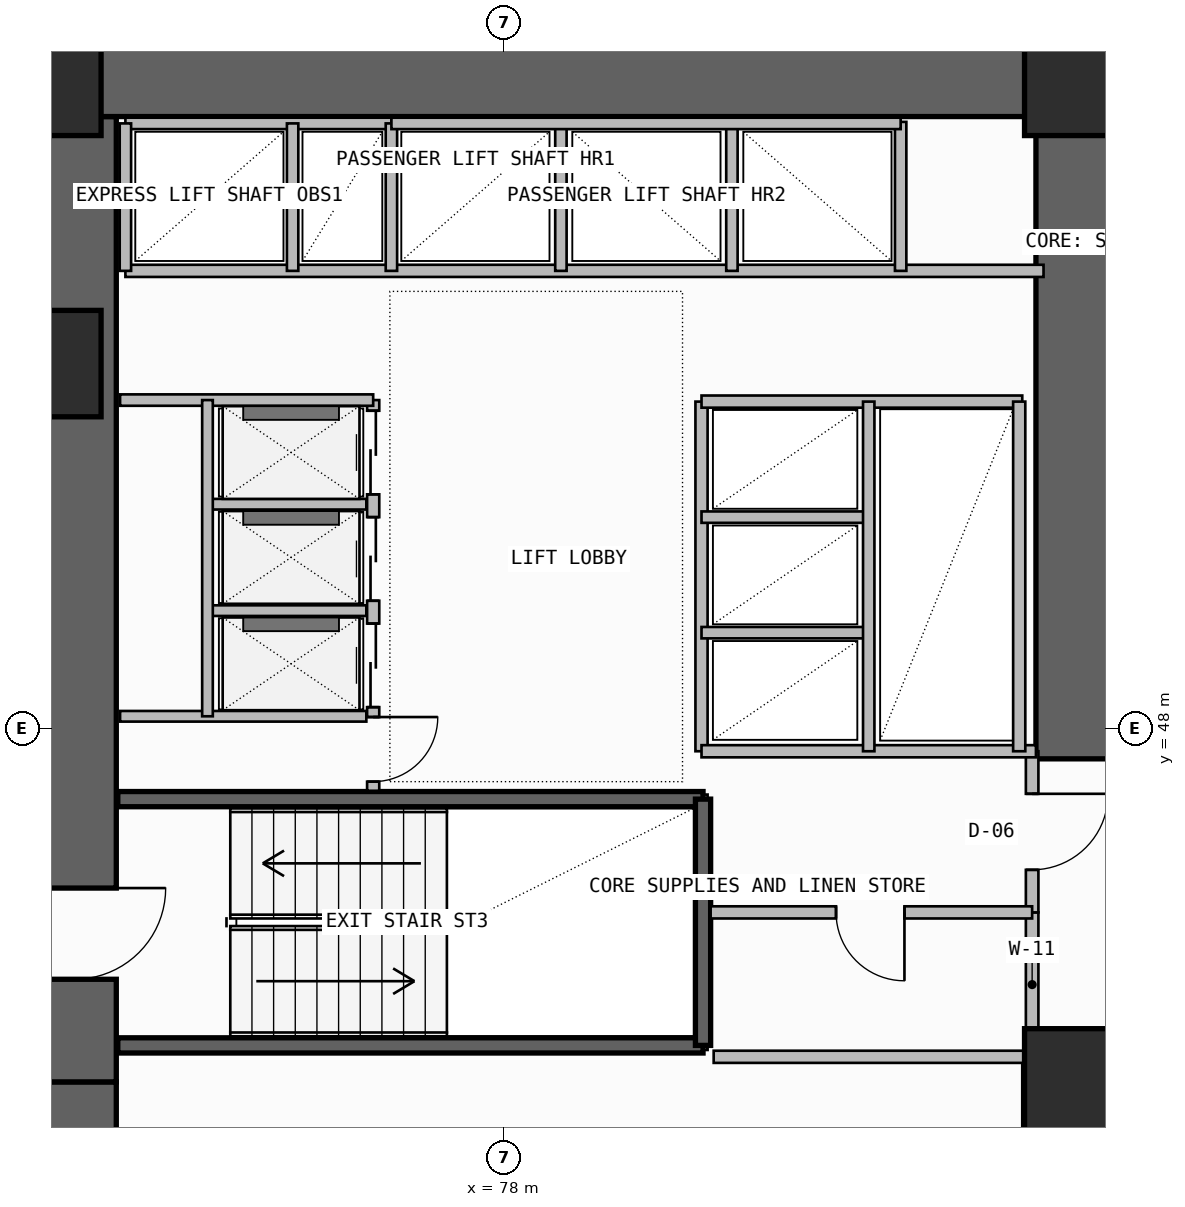
"""IFC4 building model, lengths in metres.
Left out: names, types, materials, properties, quantities, classifications, styles, units other than length and angle.
Written with IfcOpenShell. Run it as: python <this file> out.ifc"""

import sys

from ifc_helpers import new_model, si_unit, direction, frame, frame_2d, origin, origin_2d, place, context, subcontext, project, spatial, rectangle, extrude, element, fill, save


model = new_model("IFC4")
c1 = context("Model", 3, precision=1e-05, world=origin(), true_north=direction((0.0, 1.0)))
c2 = subcontext(c1, "Body", "Model", "MODEL_VIEW")
j1 = project(units=[si_unit("LENGTHUNIT", "METRE"), si_unit("PLANEANGLEUNIT", "RADIAN")], contexts=[c1])
p1 = place(None, origin())
s1 = spatial("IfcSite", under=j1, at=p1, CompositionType="ELEMENT")
p2 = place(p1, origin())
s2 = spatial("IfcBuilding", under=s1, at=p2, CompositionType="ELEMENT")
p3 = place(p2, frame((0.0, 0.0, 70.5)))
s3 = spatial("IfcBuildingStorey", under=s2, at=p3, CompositionType="ELEMENT", Elevation=70.5)
p4 = place(p3, frame((72.35, 35.5, -0.26), z_axis=(0.0, 0.0, 1.0), x_axis=(0.0, 1.0, 0.0)))
e1 = element("IfcWall", 1, at=p4, inside=s3, PredefinedType="SHEAR", context=c2, shape_type="SweptSolid", body=[
    extrude(rectangle(XDim=7.85, YDim=1.1, at=frame_2d((3.925, 0.0))), origin(), (0.0, 0.0, 1.0), 3.6),
])
p5 = place(p4, frame((1.45, 0.0, 0.26)))
e2 = element("IfcOpeningElement", 2, at=p5, cuts=e1, PredefinedType="OPENING", context=c2, shape_type="SweptSolid", body=[
    extrude(rectangle(XDim=1.2, YDim=2.2, at=frame_2d((0.6, 1.1))), frame((0.0, 0.56, 0.0), z_axis=(0.0, -1.0, 0.0), x_axis=(1.0, 0.0, 0.0)), (0.0, 0.0, 1.0), 1.12),
])
p6 = place(p3, frame((72.35, 43.35, -0.26), z_axis=(0.0, 0.0, 1.0), x_axis=(0.0, 1.0, 0.0)))
e3 = element("IfcWall", 3, at=p6, inside=s3, PredefinedType="SHEAR", context=c2, shape_type="SweptSolid", body=[
    extrude(rectangle(XDim=12.7, YDim=1.1, at=frame_2d((6.35, 0.0))), origin(), (0.0, 0.0, 1.0), 3.6),
])
p7 = place(p6, frame((1.35, 0.0, 0.26)))
e4 = element("IfcOpeningElement", 4, at=p7, cuts=e3, PredefinedType="OPENING", context=c2, shape_type="SweptSolid", body=[
    extrude(rectangle(XDim=1.2, YDim=2.2, at=frame_2d((0.6, 1.1))), frame((0.0, 0.56, 0.0), z_axis=(0.0, -1.0, 0.0), x_axis=(1.0, 0.0, 0.0)), (0.0, 0.0, 1.0), 1.12),
])
p8 = place(p3, frame((71.8, 56.6, -0.26), z_axis=(0.0, 0.0, 1.0), x_axis=(1.0, 0.0, 0.0)))
e5 = element("IfcWall", 5, at=p8, inside=s3, PredefinedType="SHEAR", context=c2, shape_type="SweptSolid", body=[
    extrude(rectangle(XDim=14.3, YDim=1.1, at=frame_2d((7.15, 0.0))), origin(), (0.0, 0.0, 1.0), 3.6),
])
p9 = place(p3, frame((85.55, 47.6, -0.26), z_axis=(0.0, 0.0, 1.0), x_axis=(0.0, 1.0, 0.0)))
e6 = element("IfcWall", 6, at=p9, inside=s3, PredefinedType="SHEAR", context=c2, shape_type="SweptSolid", body=[
    extrude(rectangle(XDim=8.45, YDim=1.1, at=frame_2d((4.225, 0.0))), origin(), (0.0, 0.0, 1.0), 3.6),
])
for number, where, z_axis, x_axis in (
    (7, (85.55, 43.35, 0.0), (0.0, 0.0, 1.0), (1.0, 0.0, 0.0)),
    (8, (72.0, 52.8, 0.0), (0.0, 0.0, 1.0), (1.0, 0.0, 0.0)),
    (9, (72.0, 56.5, 0.0), (0.0, 0.0, 1.0), (1.0, 0.0, 0.0)),
    (10, (85.55, 56.5, 0.0), (0.0, 0.0, 1.0), (1.0, 0.0, 0.0)),
):
    element("IfcColumn", number, at=place(p3, frame(where, z_axis=z_axis, x_axis=x_axis)), inside=s3, PredefinedType="COLUMN", context=c2, shape_type="SweptSolid", body=[
        extrude(rectangle(XDim=1.4, YDim=1.4, at=origin_2d()), origin(), (0.0, 0.0, 1.0), 3.6),
    ])
p10 = place(p3, frame((84.92, 38.85, 0.0), z_axis=(0.0, 0.0, 1.0), x_axis=(0.0, 1.0, 0.0)))
e11 = element("IfcWall", 11, at=p10, inside=s3, PredefinedType="SOLIDWALL", context=c2, shape_type="SweptSolid", body=[
    extrude(rectangle(XDim=4.83, YDim=0.2, at=frame_2d((2.415, 0.0))), origin(), (0.0, 0.0, 1.0), 3.34),
])
p11 = place(p10, frame((1.25, 0.0, 0.0)))
e12 = element("IfcOpeningElement", 12, at=p11, cuts=e11, PredefinedType="OPENING", context=c2, shape_type="SweptSolid", body=[
    extrude(rectangle(XDim=1.1, YDim=2.2, at=frame_2d((0.55, 1.1))), frame((0.0, 0.11, 0.0), z_axis=(0.0, -1.0, 0.0), x_axis=(1.0, 0.0, 0.0)), (0.0, 0.0, 1.0), 0.22),
])
for number, where, z_axis, x_axis in (
    (13, (72.92, 43.83, -0.26), (0.0, 0.0, 1.0), (1.0, 0.0, 0.0)),
    (14, (72.92, 47.07, -0.26), (0.0, 0.0, 1.0), (1.0, 0.0, 0.0)),
):
    element("IfcWall", number, at=place(p3, frame(where, z_axis=z_axis, x_axis=x_axis)), inside=s3, PredefinedType="SOLIDWALL", context=c2, shape_type="SweptSolid", body=[
        extrude(rectangle(XDim=7.7, YDim=0.2, at=frame_2d((3.85, 0.0))), origin(), (0.0, 0.0, 1.0), 3.6),
    ])
p12 = place(p3, frame((80.62, 43.83, -0.26), z_axis=(0.0, 0.0, 1.0), x_axis=(0.0, 1.0, 0.0)))
e15 = element("IfcWall", 15, at=p12, inside=s3, PredefinedType="SOLIDWALL", context=c2, shape_type="SweptSolid", body=[
    extrude(rectangle(XDim=3.24, YDim=0.2, at=frame_2d((1.62, 0.0))), origin(), (0.0, 0.0, 1.0), 3.6),
])
p13 = place(p3, frame((84.95, 43.68, 0.0), z_axis=(0.0, 0.0, 1.0), x_axis=(0.0, 1.0, 0.0)))
e16 = element("IfcWall", 16, at=p13, inside=s3, PredefinedType="PLUMBINGWALL", context=c2, shape_type="SweptSolid", body=[
    extrude(rectangle(XDim=1.9, YDim=0.165, at=frame_2d((0.95, 0.0))), origin(), (0.0, 0.0, 1.0), 3.34),
])
p14 = place(p3, frame((84.95, 45.58, 0.0), z_axis=(0.0, 0.0, 1.0), x_axis=(0.0, 1.0, 0.0)))
e17 = element("IfcWall", 17, at=p14, inside=s3, PredefinedType="PARTITIONING", context=c2, shape_type="SweptSolid", body=[
    extrude(rectangle(XDim=2.12, YDim=0.165, at=frame_2d((1.06, 0.0))), origin(), (0.0, 0.0, 1.0), 3.34),
])
p15 = place(p14, frame((0.56, 0.0, 0.0)))
e18 = element("IfcOpeningElement", 18, at=p15, cuts=e17, PredefinedType="OPENING", context=c2, shape_type="SweptSolid", body=[
    extrude(rectangle(XDim=1.0, YDim=2.2, at=frame_2d((0.5, 1.1))), frame((0.0, 0.093, 0.0), z_axis=(0.0, -1.0, 0.0), x_axis=(1.0, 0.0, 0.0)), (0.0, 0.0, 1.0), 0.185),
])
p16 = place(p3, frame((80.72, 45.58, 0.0), z_axis=(0.0, 0.0, 1.0), x_axis=(1.0, 0.0, 0.0)))
e19 = element("IfcWall", 19, at=p16, inside=s3, PredefinedType="PLUMBINGWALL", context=c2, shape_type="SweptSolid", body=[
    extrude(rectangle(XDim=4.23, YDim=0.16, at=frame_2d((2.115, 0.0))), origin(), (0.0, 0.0, 1.0), 3.34),
])
p17 = place(p16, frame((1.65, 0.0, 0.0)))
e20 = element("IfcOpeningElement", 20, at=p17, cuts=e19, PredefinedType="OPENING", context=c2, shape_type="SweptSolid", body=[
    extrude(rectangle(XDim=0.9, YDim=2.1, at=frame_2d((0.45, 1.05))), frame((0.0, 0.09, 0.0), z_axis=(0.0, -1.0, 0.0), x_axis=(1.0, 0.0, 0.0)), (0.0, 0.0, 1.0), 0.18),
])
p18 = place(p3, frame((80.76, 43.68, 0.0), z_axis=(0.0, 0.0, 1.0), x_axis=(1.0, 0.0, 0.0)))
e21 = element("IfcWall", 21, at=p18, inside=s3, PredefinedType="PLUMBINGWALL", context=c2, shape_type="SweptSolid", body=[
    extrude(rectangle(XDim=4.19, YDim=0.16, at=frame_2d((2.095, 0.0))), origin(), (0.0, 0.0, 1.0), 3.34),
])
p19 = place(p3, frame((76.28, 47.18, 0.0), z_axis=(0.0, 0.0, 1.0), x_axis=(0.0, 1.0, 0.0)))
e22 = element("IfcWall", 22, at=p19, inside=s3, PredefinedType="SOLIDWALL", context=c2, shape_type="SweptSolid", body=[
    extrude(rectangle(XDim=5.14, YDim=0.16, at=frame_2d((2.57, 0.0))), origin(), (0.0, 0.0, 1.0), 3.34),
])
p20 = place(p19, frame((1.1, 0.0, 0.0)))
e23 = element("IfcOpeningElement", 23, at=p20, cuts=e22, PredefinedType="OPENING", context=c2, shape_type="SweptSolid", body=[
    extrude(rectangle(XDim=1.1, YDim=2.25, at=frame_2d((0.55, 1.125))), frame((0.0, 0.09, 0.0), z_axis=(0.0, -1.0, 0.0), x_axis=(1.0, 0.0, 0.0)), (0.0, 0.0, 1.0), 0.18),
])
p21 = place(p19, frame((2.5, 0.0, 0.0)))
e24 = element("IfcOpeningElement", 24, at=p21, cuts=e22, PredefinedType="OPENING", context=c2, shape_type="SweptSolid", body=[
    extrude(rectangle(XDim=1.1, YDim=2.25, at=frame_2d((0.55, 1.125))), frame((0.0, 0.09, 0.0), z_axis=(0.0, -1.0, 0.0), x_axis=(1.0, 0.0, 0.0)), (0.0, 0.0, 1.0), 0.18),
])
p22 = place(p19, frame((3.9, 0.0, 0.0)))
e25 = element("IfcOpeningElement", 25, at=p22, cuts=e22, PredefinedType="OPENING", context=c2, shape_type="SweptSolid", body=[
    extrude(rectangle(XDim=1.1, YDim=2.25, at=frame_2d((0.55, 1.125))), frame((0.0, 0.09, 0.0), z_axis=(0.0, -1.0, 0.0), x_axis=(1.0, 0.0, 0.0)), (0.0, 0.0, 1.0), 0.18),
])
p23 = place(p19, frame((0.12, 0.0, 0.0)))
e26 = element("IfcOpeningElement", 26, at=p23, cuts=e22, PredefinedType="OPENING", context=c2, shape_type="SweptSolid", body=[
    extrude(rectangle(XDim=0.85, YDim=2.05, at=frame_2d((0.425, 1.025))), frame((0.0, 0.09, 0.0), z_axis=(0.0, -1.0, 0.0), x_axis=(1.0, 0.0, 0.0)), (0.0, 0.0, 1.0), 0.18),
])
p24 = place(p3, frame((72.95, 52.32, 0.0), z_axis=(0.0, 0.0, 1.0), x_axis=(1.0, 0.0, 0.0)))
e27 = element("IfcWall", 27, at=p24, inside=s3, PredefinedType="SOLIDWALL", context=c2, shape_type="SweptSolid", body=[
    extrude(rectangle(XDim=3.33, YDim=0.15, at=frame_2d((1.665, 0.0))), origin(), (0.0, 0.0, 1.0), 3.34),
])
p25 = place(p3, frame((72.95, 48.16, 0.0), z_axis=(0.0, 0.0, 1.0), x_axis=(1.0, 0.0, 0.0)))
e28 = element("IfcWall", 28, at=p25, inside=s3, PredefinedType="PLUMBINGWALL", context=c2, shape_type="SweptSolid", body=[
    extrude(rectangle(XDim=3.24, YDim=0.14, at=frame_2d((1.62, 0.0))), origin(), (0.0, 0.0, 1.0), 3.34),
])
for number, where, z_axis, x_axis in (
    (29, (74.15, 49.55, 0.0), (0.0, 0.0, 1.0), (1.0, 0.0, 0.0)),
    (30, (74.15, 50.95, 0.0), (0.0, 0.0, 1.0), (1.0, 0.0, 0.0)),
):
    element("IfcWall", number, at=place(p3, frame(where, z_axis=z_axis, x_axis=x_axis)), inside=s3, PredefinedType="PLUMBINGWALL", context=c2, shape_type="SweptSolid", body=[
        extrude(rectangle(XDim=2.04, YDim=0.14, at=frame_2d((1.02, 0.0))), origin(), (0.0, 0.0, 1.0), 3.34),
    ])
p26 = place(p3, frame((74.1, 48.16, 0.0), z_axis=(0.0, 0.0, 1.0), x_axis=(0.0, 1.0, 0.0)))
e31 = element("IfcWall", 31, at=p26, inside=s3, PredefinedType="PLUMBINGWALL", context=c2, shape_type="SweptSolid", body=[
    extrude(rectangle(XDim=4.16, YDim=0.14, at=frame_2d((2.08, 0.0))), origin(), (0.0, 0.0, 1.0), 3.34),
])
p27 = place(p3, frame((80.6, 47.7, 0.0), z_axis=(0.0, 0.0, 1.0), x_axis=(0.0, 1.0, 0.0)))
e32 = element("IfcWall", 32, at=p27, inside=s3, PredefinedType="SOLIDWALL", context=c2, shape_type="SweptSolid", body=[
    extrude(rectangle(XDim=4.6, YDim=0.16, at=frame_2d((2.3, 0.0))), origin(), (0.0, 0.0, 1.0), 3.34),
])
p28 = place(p3, frame((80.6, 47.7, 0.0), z_axis=(0.0, 0.0, 1.0), x_axis=(1.0, 0.0, 0.0)))
e33 = element("IfcWall", 33, at=p28, inside=s3, PredefinedType="SOLIDWALL", context=c2, shape_type="SweptSolid", body=[
    extrude(rectangle(XDim=4.4, YDim=0.16, at=frame_2d((2.2, 0.0))), origin(), (0.0, 0.0, 1.0), 3.34),
])
p29 = place(p3, frame((80.6, 52.3, 0.0), z_axis=(0.0, 0.0, 1.0), x_axis=(1.0, 0.0, 0.0)))
e34 = element("IfcWall", 34, at=p29, inside=s3, PredefinedType="SOLIDWALL", context=c2, shape_type="SweptSolid", body=[
    extrude(rectangle(XDim=4.22, YDim=0.16, at=frame_2d((2.11, 0.0))), origin(), (0.0, 0.0, 1.0), 3.34),
])
for number, where, z_axis, x_axis in (
    (35, (80.6, 49.26, 0.0), (0.0, 0.0, 1.0), (1.0, 0.0, 0.0)),
    (36, (80.6, 50.78, 0.0), (0.0, 0.0, 1.0), (1.0, 0.0, 0.0)),
):
    element("IfcWall", number, at=place(p3, frame(where, z_axis=z_axis, x_axis=x_axis)), inside=s3, PredefinedType="PLUMBINGWALL", context=c2, shape_type="SweptSolid", body=[
        extrude(rectangle(XDim=2.2, YDim=0.15, at=frame_2d((1.1, 0.0))), origin(), (0.0, 0.0, 1.0), 3.34),
    ])
p30 = place(p3, frame((82.8, 47.7, 0.0), z_axis=(0.0, 0.0, 1.0), x_axis=(0.0, 1.0, 0.0)))
e37 = element("IfcWall", 37, at=p30, inside=s3, PredefinedType="PLUMBINGWALL", context=c2, shape_type="SweptSolid", body=[
    extrude(rectangle(XDim=4.6, YDim=0.15, at=frame_2d((2.3, 0.0))), origin(), (0.0, 0.0, 1.0), 3.34),
])
p31 = place(p3, frame((84.78, 47.7, 0.0), z_axis=(0.0, 0.0, 1.0), x_axis=(0.0, 1.0, 0.0)))
e38 = element("IfcWall", 38, at=p31, inside=s3, PredefinedType="SOLIDWALL", context=c2, shape_type="SweptSolid", body=[
    extrude(rectangle(XDim=4.6, YDim=0.16, at=frame_2d((2.3, 0.0))), origin(), (0.0, 0.0, 1.0), 3.34),
])
p32 = place(p3, frame((73.02, 54.02, 0.0), z_axis=(0.0, 0.0, 1.0), x_axis=(1.0, 0.0, 0.0)))
e39 = element("IfcWall", 39, at=p32, inside=s3, PredefinedType="SOLIDWALL", context=c2, shape_type="SweptSolid", body=[
    extrude(rectangle(XDim=12.08, YDim=0.16, at=frame_2d((6.04, 0.0))), origin(), (0.0, 0.0, 1.0), 3.34),
])
p33 = place(p3, frame((73.02, 55.96, 0.0), z_axis=(0.0, 0.0, 1.0), x_axis=(1.0, 0.0, 0.0)))
e40 = element("IfcWall", 40, at=p33, inside=s3, PredefinedType="SOLIDWALL", context=c2, shape_type="SweptSolid", body=[
    extrude(rectangle(XDim=3.5, YDim=0.15, at=frame_2d((1.75, 0.0))), origin(), (0.0, 0.0, 1.0), 3.34),
])
p34 = place(p3, frame((73.02, 54.02, 0.0), z_axis=(0.0, 0.0, 1.0), x_axis=(0.0, 1.0, 0.0)))
e41 = element("IfcWall", 41, at=p34, inside=s3, PredefinedType="PLUMBINGWALL", context=c2, shape_type="SweptSolid", body=[
    extrude(rectangle(XDim=1.94, YDim=0.15, at=frame_2d((0.97, 0.0))), origin(), (0.0, 0.0, 1.0), 3.34),
])
p35 = place(p3, frame((76.52, 54.02, 0.0), z_axis=(0.0, 0.0, 1.0), x_axis=(0.0, 1.0, 0.0)))
e42 = element("IfcWall", 42, at=p35, inside=s3, PredefinedType="SOLIDWALL", context=c2, shape_type="SweptSolid", body=[
    extrude(rectangle(XDim=1.94, YDim=0.15, at=frame_2d((0.97, 0.0))), origin(), (0.0, 0.0, 1.0), 3.34),
])
p36 = place(p3, frame((75.22, 54.02, 0.0), z_axis=(0.0, 0.0, 1.0), x_axis=(0.0, 1.0, 0.0)))
e43 = element("IfcWall", 43, at=p36, inside=s3, PredefinedType="PLUMBINGWALL", context=c2, shape_type="SweptSolid", body=[
    extrude(rectangle(XDim=1.94, YDim=0.15, at=frame_2d((0.97, 0.0))), origin(), (0.0, 0.0, 1.0), 3.34),
])
for number, where, z_axis, x_axis in (
    (44, (78.75, 54.02, 0.0), (0.0, 0.0, 1.0), (0.0, 1.0, 0.0)),
    (45, (81.0, 54.02, 0.0), (0.0, 0.0, 1.0), (0.0, 1.0, 0.0)),
):
    element("IfcWall", number, at=place(p3, frame(where, z_axis=z_axis, x_axis=x_axis)), inside=s3, PredefinedType="PLUMBINGWALL", context=c2, shape_type="SweptSolid", body=[
        extrude(rectangle(XDim=1.96, YDim=0.15, at=frame_2d((0.98, 0.0))), origin(), (0.0, 0.0, 1.0), 3.34),
    ])
p37 = place(p3, frame((83.22, 54.02, 0.0), z_axis=(0.0, 0.0, 1.0), x_axis=(0.0, 1.0, 0.0)))
e46 = element("IfcWall", 46, at=p37, inside=s3, PredefinedType="SOLIDWALL", context=c2, shape_type="SweptSolid", body=[
    extrude(rectangle(XDim=1.96, YDim=0.15, at=frame_2d((0.98, 0.0))), origin(), (0.0, 0.0, 1.0), 3.34),
])
p38 = place(p3, frame((76.52, 55.96, 0.0), z_axis=(0.0, 0.0, 1.0), x_axis=(1.0, 0.0, 0.0)))
e47 = element("IfcWall", 47, at=p38, inside=s3, PredefinedType="SOLIDWALL", context=c2, shape_type="SweptSolid", body=[
    extrude(rectangle(XDim=6.7, YDim=0.15, at=frame_2d((3.35, 0.0))), origin(), (0.0, 0.0, 1.0), 3.34),
])
p39 = place(p7, frame((1.2, 0.0, 0.0), z_axis=(0.0, 0.0, 1.0), x_axis=(-1.0, 0.0, 0.0)))
e48 = element("IfcDoor", 48, at=p39, inside=s3, OperationType="SINGLE_SWING_LEFT", PredefinedType="USERDEFINED", context=c2, shape_type="SweptSolid", body=[
    extrude(rectangle(XDim=1.2, YDim=2.2, at=frame_2d((0.6, 1.1))), frame((0.0, 0.025, 0.0), z_axis=(0.0, -1.0, 0.0), x_axis=(1.0, 0.0, 0.0)), (0.0, 0.0, 1.0), 0.05),
])
fill(e4, e48)
p40 = place(p15, frame((1.0, 0.0, 0.0), z_axis=(0.0, 0.0, 1.0), x_axis=(-1.0, 0.0, 0.0)))
e49 = element("IfcDoor", 49, at=p40, inside=s3, OperationType="SINGLE_SWING_LEFT", PredefinedType="DOOR", context=c2, shape_type="SweptSolid", body=[
    extrude(rectangle(XDim=1.0, YDim=2.2, at=frame_2d((0.5, 1.1))), frame((0.0, 0.025, 0.0), z_axis=(0.0, -1.0, 0.0), x_axis=(1.0, 0.0, 0.0)), (0.0, 0.0, 1.0), 0.05),
])
fill(e18, e49)
p41 = place(p17, frame((0.9, 0.0, 0.0), z_axis=(0.0, 0.0, 1.0), x_axis=(-1.0, 0.0, 0.0)))
e50 = element("IfcDoor", 50, at=p41, inside=s3, OperationType="SINGLE_SWING_LEFT", PredefinedType="DOOR", context=c2, shape_type="SweptSolid", body=[
    extrude(rectangle(XDim=0.9, YDim=2.1, at=frame_2d((0.45, 1.05))), frame((0.0, 0.025, 0.0), z_axis=(0.0, -1.0, 0.0), x_axis=(1.0, 0.0, 0.0)), (0.0, 0.0, 1.0), 0.05),
])
fill(e20, e50)
p42 = place(p20, origin())
e51 = element("IfcDoor", 51, at=p42, inside=s3, OperationType="DOUBLE_DOOR_SLIDING", PredefinedType="DOOR", context=c2, shape_type="SweptSolid", body=[
    extrude(rectangle(XDim=1.1, YDim=2.25, at=frame_2d((0.55, 1.125))), frame((0.0, 0.025, 0.0), z_axis=(0.0, -1.0, 0.0), x_axis=(1.0, 0.0, 0.0)), (0.0, 0.0, 1.0), 0.05),
])
fill(e23, e51)
p43 = place(p21, origin())
e52 = element("IfcDoor", 52, at=p43, inside=s3, OperationType="DOUBLE_DOOR_SLIDING", PredefinedType="DOOR", context=c2, shape_type="SweptSolid", body=[
    extrude(rectangle(XDim=1.1, YDim=2.25, at=frame_2d((0.55, 1.125))), frame((0.0, 0.025, 0.0), z_axis=(0.0, -1.0, 0.0), x_axis=(1.0, 0.0, 0.0)), (0.0, 0.0, 1.0), 0.05),
])
fill(e24, e52)
p44 = place(p22, origin())
e53 = element("IfcDoor", 53, at=p44, inside=s3, OperationType="DOUBLE_DOOR_SLIDING", PredefinedType="DOOR", context=c2, shape_type="SweptSolid", body=[
    extrude(rectangle(XDim=1.1, YDim=2.25, at=frame_2d((0.55, 1.125))), frame((0.0, 0.025, 0.0), z_axis=(0.0, -1.0, 0.0), x_axis=(1.0, 0.0, 0.0)), (0.0, 0.0, 1.0), 0.05),
])
fill(e25, e53)
p45 = place(p23, frame((0.85, 0.0, 0.0), z_axis=(0.0, 0.0, 1.0), x_axis=(-1.0, 0.0, 0.0)))
e54 = element("IfcDoor", 54, at=p45, inside=s3, OperationType="SINGLE_SWING_LEFT", PredefinedType="DOOR", context=c2, shape_type="SweptSolid", body=[
    extrude(rectangle(XDim=0.85, YDim=2.05, at=frame_2d((0.425, 1.025))), frame((0.0, 0.025, 0.0), z_axis=(0.0, -1.0, 0.0), x_axis=(1.0, 0.0, 0.0)), (0.0, 0.0, 1.0), 0.05),
])
fill(e26, e54)
save(model, sys.argv[1])
